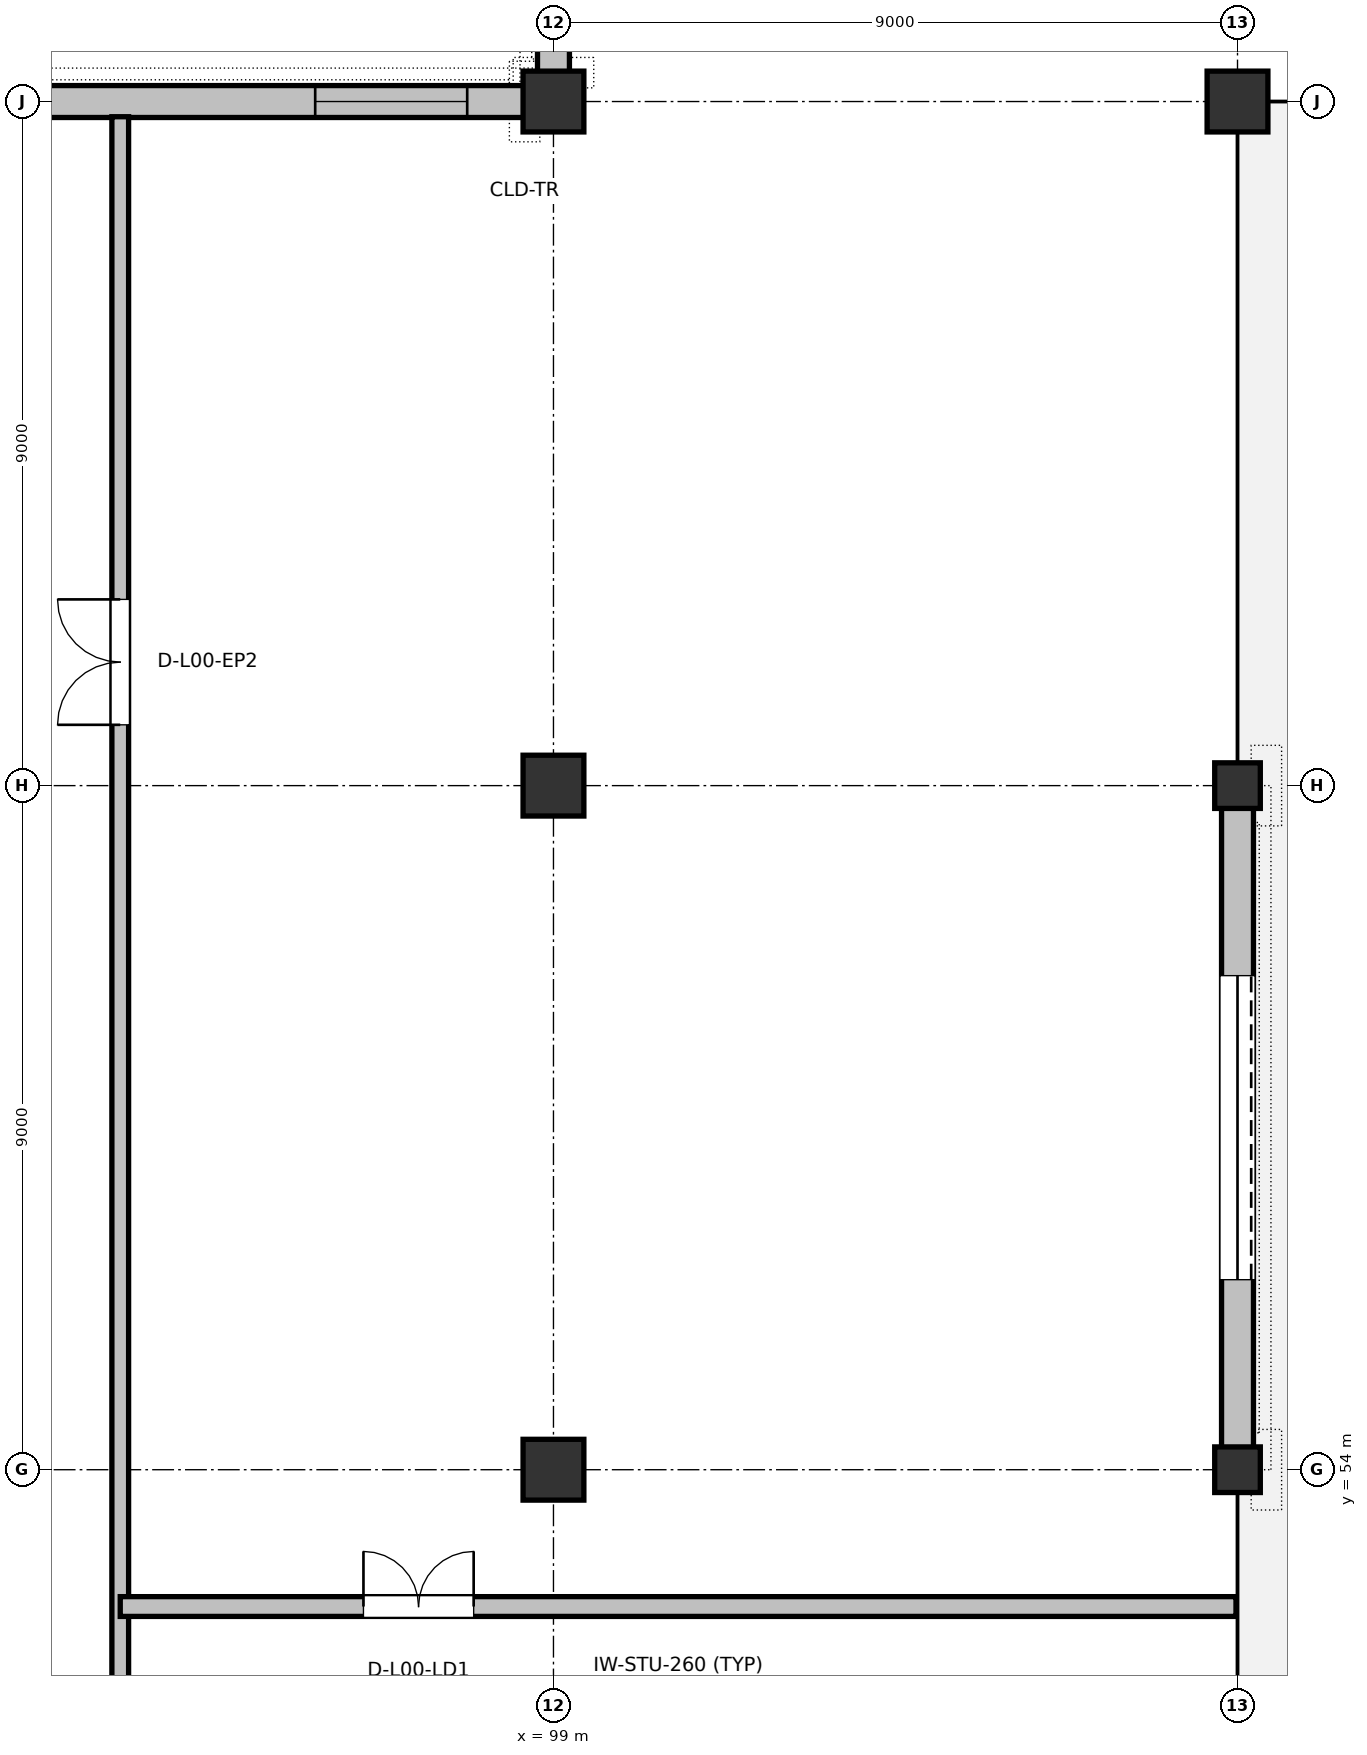
"""IFC4 building model, lengths in metres.
Left out: names, types, materials, properties, quantities, classifications, styles, units other than length and angle.
Written with IfcOpenShell. Run it as: python <this file> out.ifc"""

import sys

from ifc_helpers import new_model, si_unit, direction, frame, frame_2d, origin, origin_2d, place, context, subcontext, project, spatial, rectangle, extrude, element, fill, save


model = new_model("IFC4")
c1 = context("Model", 3, precision=1e-05, world=origin(), true_north=direction((0.0, 1.0)))
c2 = subcontext(c1, "Body", "Model", "MODEL_VIEW")
j1 = project(units=[si_unit("LENGTHUNIT", "METRE"), si_unit("PLANEANGLEUNIT", "RADIAN")], contexts=[c1])
p1 = place(None, origin())
s1 = spatial("IfcSite", under=j1, at=p1, CompositionType="ELEMENT")
p2 = place(p1, origin())
s2 = spatial("IfcBuilding", under=s1, at=p2, CompositionType="ELEMENT")
p3 = place(p2, origin())
s3 = spatial("IfcBuildingStorey", under=s2, at=p3, CompositionType="ELEMENT", Elevation=0.0)
for number, where, z_axis, x_axis in (
    (1, (99.0, 54.0, 0.0), (0.0, 0.0, 1.0), (1.0, 0.0, 0.0)),
    (2, (99.0, 63.0, 0.0), (0.0, 0.0, 1.0), (1.0, 0.0, 0.0)),
    (3, (99.0, 72.0, 0.0), (0.0, 0.0, 1.0), (1.0, 0.0, 0.0)),
):
    element("IfcColumn", number, at=place(p3, frame(where, z_axis=z_axis, x_axis=x_axis)), inside=s3, PredefinedType="COLUMN", context=c2, shape_type="SweptSolid", body=[
        extrude(rectangle(XDim=0.8, YDim=0.8, at=origin_2d()), origin(), (0.0, 0.0, 1.0), 5.4),
    ])
for number, where, z_axis, x_axis in (
    (4, (108.0, 54.0, 0.0), (0.0, 0.0, 1.0), (1.0, 0.0, 0.0)),
    (5, (108.0, 63.0, 0.0), (0.0, 0.0, 1.0), (1.0, 0.0, 0.0)),
):
    element("IfcColumn", number, at=place(p3, frame(where, z_axis=z_axis, x_axis=x_axis)), inside=s3, PredefinedType="COLUMN", context=c2, shape_type="SweptSolid", body=[
        extrude(rectangle(XDim=0.6, YDim=0.6, at=origin_2d()), origin(), (0.0, 0.0, 1.0), 5.4),
    ])
p4 = place(p3, frame((108.0, 72.0, 0.0), z_axis=(0.0, 0.0, 1.0), x_axis=(1.0, 0.0, 0.0)))
e6 = element("IfcColumn", 6, at=p4, inside=s3, PredefinedType="COLUMN", context=c2, shape_type="SweptSolid", body=[
    extrude(rectangle(XDim=0.8, YDim=0.8, at=origin_2d()), origin(), (0.0, 0.0, 1.0), 5.4),
])
p5 = place(p3, frame((99.0, 80.665, 0.0), z_axis=(0.0, 0.0, 1.0), x_axis=(0.0, -1.0, 0.0)))
e7 = element("IfcWall", 7, at=p5, inside=s3, PredefinedType="STANDARD", context=c2, shape_type="SweptSolid", body=[
    extrude(rectangle(XDim=8.28, YDim=0.42, at=frame_2d((4.14, 0.0))), origin(), (0.0, 0.0, 1.0), 4.755),
])
p6 = place(p5, frame((0.75, 0.0, 0.9)))
e8 = element("IfcOpeningElement", 8, at=p6, cuts=e7, PredefinedType="OPENING", context=c2, shape_type="SweptSolid", body=[
    extrude(rectangle(XDim=2.4, YDim=1.7, at=frame_2d((1.2, 0.85))), frame((0.0, 0.22, 0.0), z_axis=(0.0, -1.0, 0.0), x_axis=(1.0, 0.0, 0.0)), (0.0, 0.0, 1.0), 0.44),
])
p7 = place(p3, frame((98.615, 72.0, 0.0), z_axis=(0.0, 0.0, 1.0), x_axis=(-1.0, 0.0, 0.0)))
e9 = element("IfcWall", 9, at=p7, inside=s3, PredefinedType="STANDARD", context=c2, shape_type="SweptSolid", body=[
    extrude(rectangle(XDim=8.23, YDim=0.42, at=frame_2d((4.115, 0.0))), origin(), (0.0, 0.0, 1.0), 4.795),
])
p8 = place(p7, frame((0.75, 0.0, 0.9)))
e10 = element("IfcOpeningElement", 10, at=p8, cuts=e9, PredefinedType="OPENING", context=c2, shape_type="SweptSolid", body=[
    extrude(rectangle(XDim=2.0, YDim=1.6, at=frame_2d((1.0, 0.8))), frame((0.0, 0.22, 0.0), z_axis=(0.0, -1.0, 0.0), x_axis=(1.0, 0.0, 0.0)), (0.0, 0.0, 1.0), 0.44),
])
p9 = place(p3, frame((108.0, 54.285, 0.0), z_axis=(0.0, 0.0, 1.0), x_axis=(0.0, 1.0, 0.0)))
e11 = element("IfcWall", 11, at=p9, inside=s3, PredefinedType="STANDARD", context=c2, shape_type="SweptSolid", body=[
    extrude(rectangle(XDim=8.43, YDim=0.42, at=frame_2d((4.215, 0.0))), origin(), (0.0, 0.0, 1.0), 4.775),
])
p10 = place(p9, frame((2.215, 0.0, 0.0)))
e12 = element("IfcOpeningElement", 12, at=p10, cuts=e11, PredefinedType="OPENING", context=c2, shape_type="SweptSolid", body=[
    extrude(rectangle(XDim=4.0, YDim=3.8, at=frame_2d((2.0, 1.9))), frame((0.0, 0.22, 0.0), z_axis=(0.0, -1.0, 0.0), x_axis=(1.0, 0.0, 0.0)), (0.0, 0.0, 1.0), 0.44),
])
p11 = place(p3, frame((93.3, 18.2, 0.0), z_axis=(0.0, 0.0, 1.0), x_axis=(0.0, 1.0, 0.0)))
e13 = element("IfcWall", 13, at=p11, inside=s3, PredefinedType="PARTITIONING", context=c2, shape_type="SweptSolid", body=[
    extrude(rectangle(XDim=53.6, YDim=0.22, at=frame_2d((26.8, 0.0))), origin(), (0.0, 0.0, 1.0), 5.16),
])
p12 = place(p11, frame((4.2, 0.0, 0.0)))
e14 = element("IfcOpeningElement", 14, at=p12, cuts=e13, PredefinedType="OPENING", context=c2, shape_type="SweptSolid", body=[
    extrude(rectangle(XDim=1.65, YDim=2.25, at=frame_2d((0.825, 1.125))), frame((0.0, 0.12, 0.0), z_axis=(0.0, -1.0, 0.0), x_axis=(1.0, 0.0, 0.0)), (0.0, 0.0, 1.0), 0.24),
])
p13 = place(p11, frame((45.6, 0.0, 0.0)))
e15 = element("IfcOpeningElement", 15, at=p13, cuts=e13, PredefinedType="OPENING", context=c2, shape_type="SweptSolid", body=[
    extrude(rectangle(XDim=1.65, YDim=2.25, at=frame_2d((0.825, 1.125))), frame((0.0, 0.12, 0.0), z_axis=(0.0, -1.0, 0.0), x_axis=(1.0, 0.0, 0.0)), (0.0, 0.0, 1.0), 0.24),
])
p14 = place(p3, frame((93.3, 52.2, 0.0), z_axis=(0.0, 0.0, 1.0), x_axis=(1.0, 0.0, 0.0)))
e16 = element("IfcWall", 16, at=p14, inside=s3, PredefinedType="PARTITIONING", context=c2, shape_type="SweptSolid", body=[
    extrude(rectangle(XDim=14.68, YDim=0.26, at=frame_2d((7.34, 0.0))), origin(), (0.0, 0.0, 1.0), 5.16),
])
p15 = place(p14, frame((3.2, 0.0, 0.0)))
e17 = element("IfcOpeningElement", 17, at=p15, cuts=e16, PredefinedType="OPENING", context=c2, shape_type="SweptSolid", body=[
    extrude(rectangle(XDim=1.45, YDim=2.22, at=frame_2d((0.725, 1.11))), frame((0.0, 0.14, 0.0), z_axis=(0.0, -1.0, 0.0), x_axis=(1.0, 0.0, 0.0)), (0.0, 0.0, 1.0), 0.28),
])
p16 = place(p10, frame((4.0, 0.0, 0.0), z_axis=(0.0, 0.0, 1.0), x_axis=(-1.0, 0.0, 0.0)))
e18 = element("IfcDoor", 18, at=p16, inside=s3, OperationType="ROLLINGUP", PredefinedType="DOOR", context=c2, shape_type="SweptSolid", body=[
    extrude(rectangle(XDim=4.0, YDim=3.8, at=frame_2d((2.0, 1.9))), frame((0.0, 0.025, 0.0), z_axis=(0.0, -1.0, 0.0), x_axis=(1.0, 0.0, 0.0)), (0.0, 0.0, 1.0), 0.05),
])
fill(e12, e18)
p17 = place(p8, origin())
e19 = element("IfcWindow", 19, at=p17, inside=s3, PartitioningType="SINGLE_PANEL", PredefinedType="WINDOW", context=c2, shape_type="SweptSolid", body=[
    extrude(rectangle(XDim=2.0, YDim=1.6, at=frame_2d((1.0, 0.8))), frame((0.0, 0.03, 0.0), z_axis=(0.0, -1.0, 0.0), x_axis=(1.0, 0.0, 0.0)), (0.0, 0.0, 1.0), 0.06),
])
fill(e10, e19)
p18 = place(p13, origin())
e20 = element("IfcDoor", 20, at=p18, inside=s3, OperationType="DOUBLE_DOOR_SINGLE_SWING", PredefinedType="DOOR", context=c2, shape_type="SweptSolid", body=[
    extrude(rectangle(XDim=1.65, YDim=2.25, at=frame_2d((0.825, 1.125))), frame((0.0, 0.025, 0.0), z_axis=(0.0, -1.0, 0.0), x_axis=(1.0, 0.0, 0.0)), (0.0, 0.0, 1.0), 0.05),
])
fill(e15, e20)
p19 = place(p15, origin())
e21 = element("IfcDoor", 21, at=p19, inside=s3, OperationType="DOUBLE_DOOR_SINGLE_SWING", PredefinedType="DOOR", context=c2, shape_type="SweptSolid", body=[
    extrude(rectangle(XDim=1.45, YDim=2.22, at=frame_2d((0.725, 1.11))), frame((0.0, 0.025, 0.0), z_axis=(0.0, -1.0, 0.0), x_axis=(1.0, 0.0, 0.0)), (0.0, 0.0, 1.0), 0.05),
])
fill(e17, e21)
save(model, sys.argv[1])
